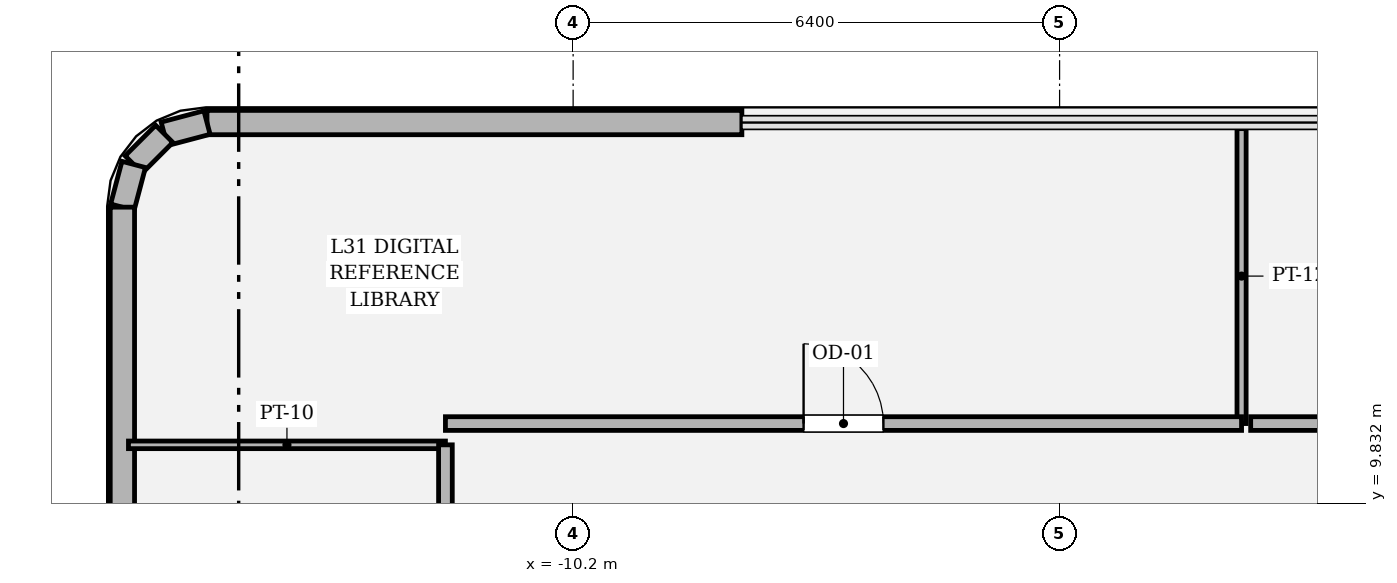
"""IFC4 building model, lengths in metres.
Left out: names, types, materials, properties, quantities, classifications, styles, units other than length and angle.
Written with IfcOpenShell. Run it as: python <this file> out.ifc"""

import sys

from ifc_helpers import new_model, si_unit, direction, frame, frame_2d, origin, place, context, subcontext, project, spatial, rectangle, extrude, element, fill, save


model = new_model("IFC4")
c1 = context("Model", 3, precision=1e-05, world=origin(), true_north=direction((0.0, 1.0)))
c2 = subcontext(c1, "Body", "Model", "MODEL_VIEW")
j1 = project(units=[si_unit("LENGTHUNIT", "METRE"), si_unit("PLANEANGLEUNIT", "RADIAN")], contexts=[c1])
p1 = place(None, origin())
s1 = spatial("IfcSite", under=j1, at=p1, CompositionType="ELEMENT")
p2 = place(p1, origin())
s2 = spatial("IfcBuilding", under=s1, at=p2, CompositionType="ELEMENT")
p3 = place(p2, frame((0.0, 0.0, 135.0)))
s3 = spatial("IfcBuildingStorey", under=s2, at=p3, CompositionType="ELEMENT", Elevation=135.0)
p4 = place(p3, frame((-7.98, 14.84, 0.0), z_axis=(0.0, 0.0, 1.0), x_axis=(-1.0, 0.0, 0.0)))
e1 = element("IfcWall", 1, at=p4, inside=s3, PredefinedType="SOLIDWALL", context=c2, shape_type="SweptSolid", body=[
    extrude(rectangle(XDim=7.037, YDim=0.32, at=frame_2d((3.519, 0.0))), origin(), (0.0, 0.0, 1.0), 3.194),
])
p5 = place(p3, frame((-15.017, 14.84, 0.0), z_axis=(0.0, 0.0, 1.0), x_axis=(-0.966665515501, -0.256042537758, 0.0)))
e2 = element("IfcWall", 2, at=p5, inside=s3, PredefinedType="SOLIDWALL", context=c2, shape_type="SweptSolid", body=[
    extrude(rectangle(XDim=0.582, YDim=0.32, at=frame_2d((0.291, 0.0))), origin(), (0.0, 0.0, 1.0), 4.52),
])
p6 = place(p3, frame((-15.579, 14.691, 0.0), z_axis=(0.0, 0.0, 1.0), x_axis=(-0.707106781187, -0.707106781187, 0.0)))
e3 = element("IfcWall", 3, at=p6, inside=s3, PredefinedType="SOLIDWALL", context=c2, shape_type="SweptSolid", body=[
    extrude(rectangle(XDim=0.569, YDim=0.32, at=frame_2d((0.284, 0.0))), origin(), (0.0, 0.0, 1.0), 4.52),
])
p7 = place(p3, frame((-15.981, 14.289, 0.0), z_axis=(0.0, 0.0, 1.0), x_axis=(-0.255650250031, -0.966769336325, 0.0)))
e4 = element("IfcWall", 4, at=p7, inside=s3, PredefinedType="SOLIDWALL", context=c2, shape_type="SweptSolid", body=[
    extrude(rectangle(XDim=0.582, YDim=0.32, at=frame_2d((0.291, 0.0))), origin(), (0.0, 0.0, 1.0), 4.52),
])
p8 = place(p3, frame((-16.13, 13.727, 0.0), z_axis=(0.0, 0.0, 1.0), x_axis=(0.0, -1.0, 0.0)))
e5 = element("IfcWall", 5, at=p8, inside=s3, PredefinedType="SOLIDWALL", context=c2, shape_type="SweptSolid", body=[
    extrude(rectangle(XDim=7.037, YDim=0.32, at=frame_2d((3.519, 0.0))), origin(), (0.0, 0.0, 1.0), 3.194),
])
p9 = place(p3, frame((-16.05, 10.6, 0.0), z_axis=(0.0, 0.0, 1.0), x_axis=(1.0, 0.0, 0.0)))
e6 = element("IfcWall", 6, at=p9, inside=s3, PredefinedType="PARTITIONING", context=c2, shape_type="SweptSolid", body=[
    extrude(rectangle(XDim=4.17, YDim=0.1, at=frame_2d((2.085, 0.0))), origin(), (0.0, 0.0, 1.0), 4.114),
])
p10 = place(p3, frame((-11.88, 10.6, 0.0), z_axis=(0.0, 0.0, 1.0), x_axis=(0.0, -1.0, 0.0)))
e7 = element("IfcWall", 7, at=p10, inside=s3, PredefinedType="PARTITIONING", context=c2, shape_type="SweptSolid", body=[
    extrude(rectangle(XDim=10.54, YDim=0.18, at=frame_2d((5.27, 0.0))), origin(), (0.0, 0.0, 1.0), 3.194),
])
p11 = place(p10, frame((4.76, 0.0, 0.0)))
e8 = element("IfcOpeningElement", 8, at=p11, cuts=e7, PredefinedType="OPENING", context=c2, shape_type="SweptSolid", body=[
    extrude(rectangle(XDim=1.02, YDim=2.2, at=frame_2d((0.51, 1.1))), frame((0.0, 0.1, 0.0), z_axis=(0.0, -1.0, 0.0), x_axis=(1.0, 0.0, 0.0)), (0.0, 0.0, 1.0), 0.2),
])
p12 = place(p3, frame((-1.406, 14.76, 0.0), z_axis=(0.0, 0.0, 1.0), x_axis=(0.0, -1.0, 0.0)))
e9 = element("IfcWall", 9, at=p12, inside=s3, PredefinedType="PARTITIONING", context=c2, shape_type="SweptSolid", body=[
    extrude(rectangle(XDim=3.88, YDim=0.12, at=frame_2d((1.94, 0.0))), origin(), (0.0, 0.0, 1.0), 4.52),
])
p13 = place(p3, frame((-1.406, 10.88, 0.0), z_axis=(0.0, 0.0, 1.0), x_axis=(-1.0, 0.0, 0.0)))
e10 = element("IfcWall", 10, at=p13, inside=s3, PredefinedType="PARTITIONING", context=c2, shape_type="SweptSolid", body=[
    extrude(rectangle(XDim=10.474, YDim=0.18, at=frame_2d((5.237, 0.0))), origin(), (0.0, 0.0, 1.0), 3.194),
])
p14 = place(p13, frame((4.712, 0.0, 0.0)))
e11 = element("IfcOpeningElement", 11, at=p14, cuts=e10, PredefinedType="OPENING", context=c2, shape_type="SweptSolid", body=[
    extrude(rectangle(XDim=1.05, YDim=2.2, at=frame_2d((0.525, 1.1))), frame((0.0, 0.1, 0.0), z_axis=(0.0, -1.0, 0.0), x_axis=(1.0, 0.0, 0.0)), (0.0, 0.0, 1.0), 0.2),
])
p15 = place(p3, frame((11.88, 10.88, 0.0), z_axis=(0.0, 0.0, 1.0), x_axis=(-1.0, 0.0, 0.0)))
e12 = element("IfcWall", 12, at=p15, inside=s3, PredefinedType="PARTITIONING", context=c2, shape_type="SweptSolid", body=[
    extrude(rectangle(XDim=13.166, YDim=0.18, at=frame_2d((6.583, 0.0))), origin(), (0.0, 0.0, 1.0), 3.194),
])
p16 = place(p15, frame((6.058, 0.0, 0.0)))
e13 = element("IfcOpeningElement", 13, at=p16, cuts=e12, PredefinedType="OPENING", context=c2, shape_type="SweptSolid", body=[
    extrude(rectangle(XDim=1.05, YDim=2.2, at=frame_2d((0.525, 1.1))), frame((0.0, 0.1, 0.0), z_axis=(0.0, -1.0, 0.0), x_axis=(1.0, 0.0, 0.0)), (0.0, 0.0, 1.0), 0.2),
])
p17 = place(p14, origin())
e14 = element("IfcDoor", 14, at=p17, inside=s3, OperationType="SINGLE_SWING_RIGHT", PredefinedType="DOOR", context=c2, shape_type="SweptSolid", body=[
    extrude(rectangle(XDim=1.05, YDim=2.2, at=frame_2d((0.525, 1.1))), frame((0.0, 0.025, 0.0), z_axis=(0.0, -1.0, 0.0), x_axis=(1.0, 0.0, 0.0)), (0.0, 0.0, 1.0), 0.05),
])
fill(e11, e14)
save(model, sys.argv[1])
